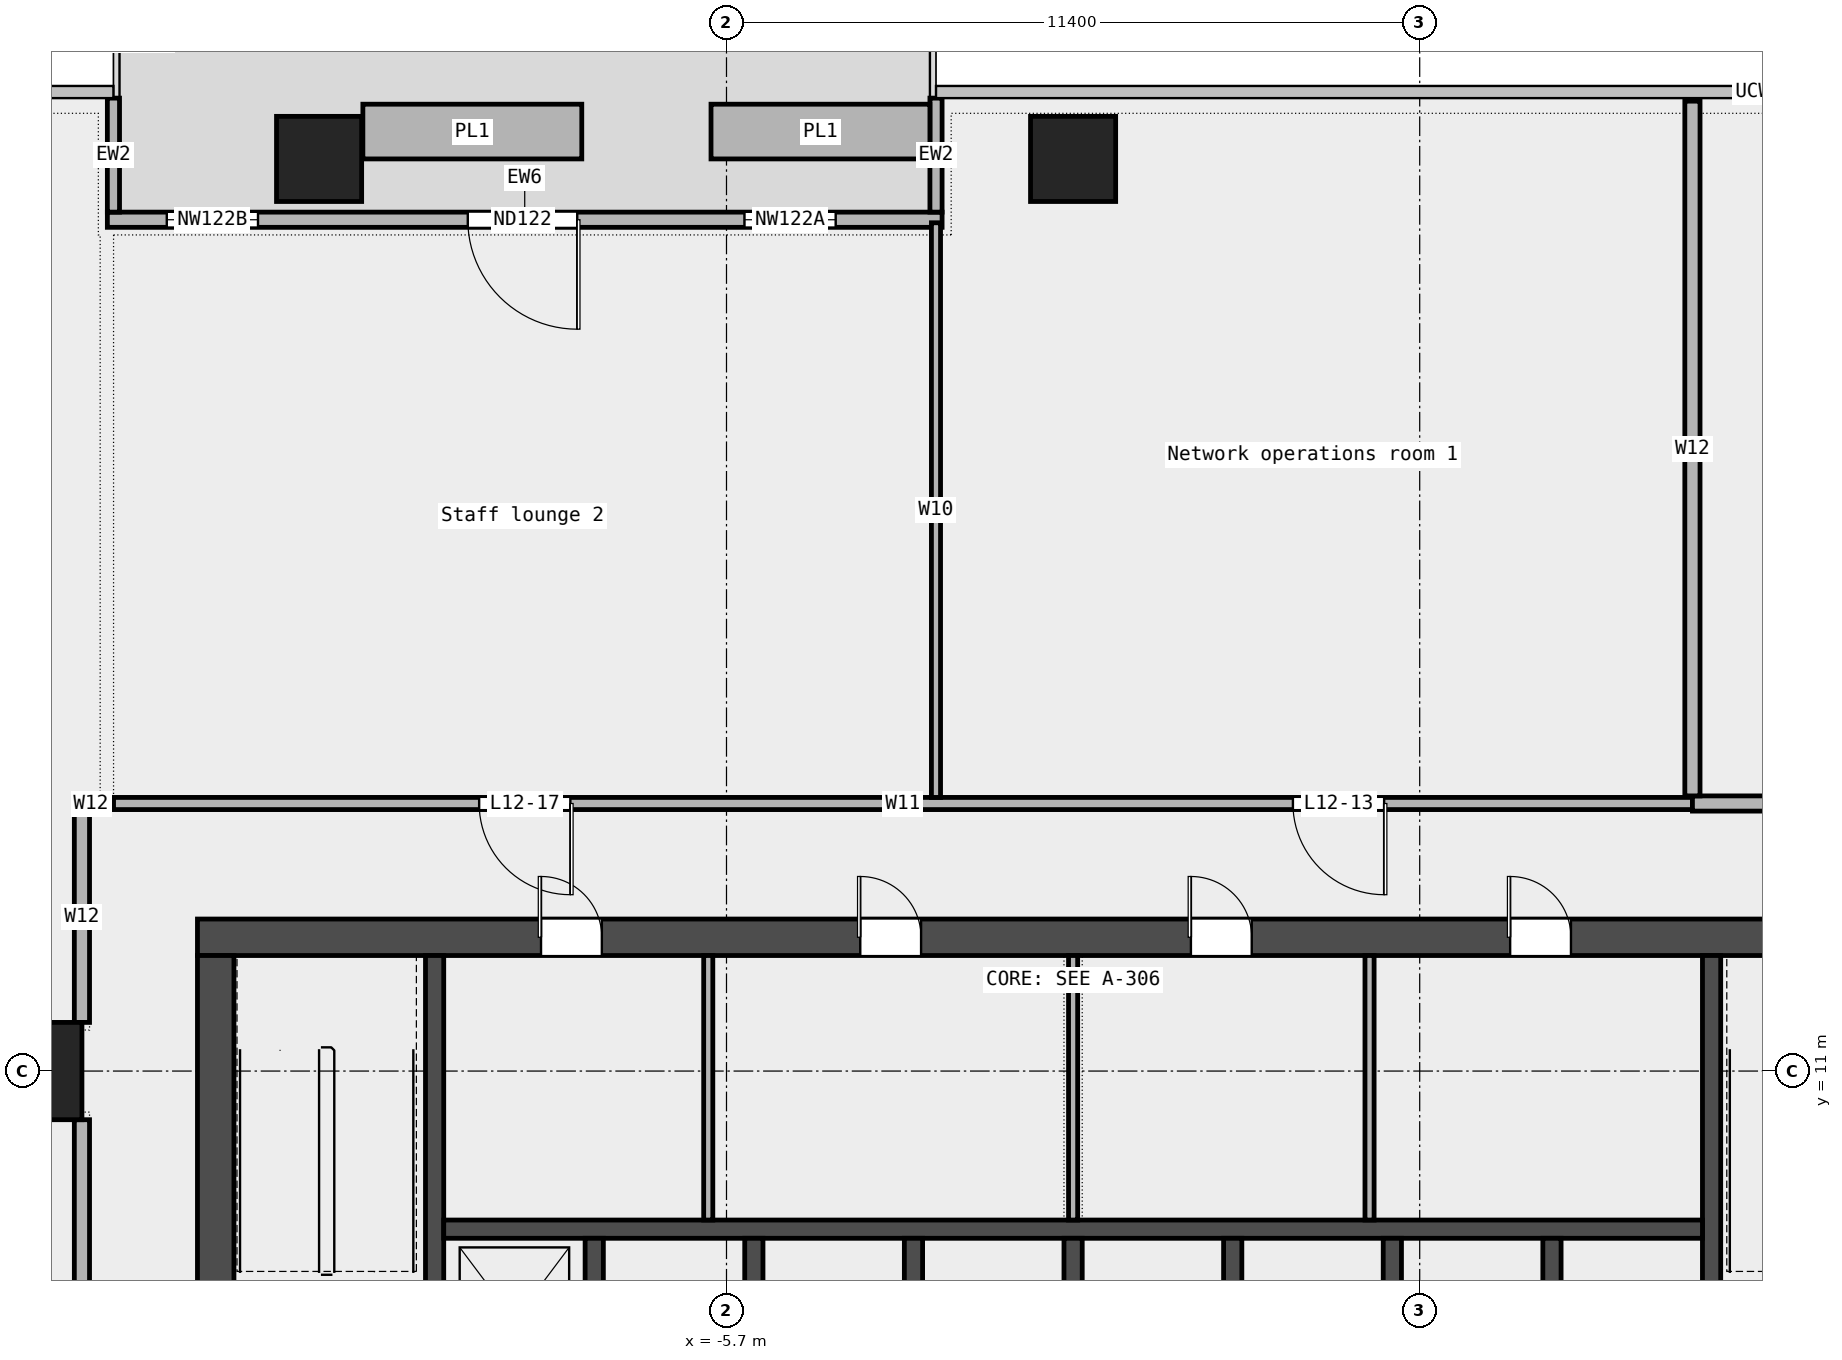
"""IFC4 building model, lengths in metres.
Left out: names, types, materials, properties, quantities, classifications, styles, units other than length and angle.
Written with IfcOpenShell. Run it as: python <this file> out.ifc"""

import sys

from ifc_helpers import new_model, si_unit, direction, frame, frame_2d, origin, origin_2d, place, context, subcontext, project, spatial, rectangle, extrude, element, fill, save


model = new_model("IFC4")
c1 = context("Model", 3, precision=1e-05, world=origin(), true_north=direction((0.0, 1.0)))
c2 = subcontext(c1, "Body", "Model", "MODEL_VIEW")
j1 = project(units=[si_unit("LENGTHUNIT", "METRE"), si_unit("PLANEANGLEUNIT", "RADIAN")], contexts=[c1])
p1 = place(None, origin())
s1 = spatial("IfcSite", under=j1, at=p1, CompositionType="ELEMENT")
p2 = place(p1, origin())
s2 = spatial("IfcBuilding", under=s1, at=p2, CompositionType="ELEMENT")
p3 = place(p2, frame((0.0, 0.0, 64.6)))
s3 = spatial("IfcBuildingStorey", under=s2, at=p3, CompositionType="ELEMENT", Elevation=64.6)
for number, where, z_axis, x_axis in (
    (1, (0.0, 26.0, 0.0), (0.0, 0.0, 1.0), (1.0, 0.0, 0.0)),
    (2, (-12.4, 26.0, 0.0), (0.0, 0.0, 1.0), (1.0, 0.0, 0.0)),
):
    element("IfcColumn", number, at=place(p3, frame(where, z_axis=z_axis, x_axis=x_axis)), inside=s3, PredefinedType="COLUMN", context=c2, shape_type="SweptSolid", body=[
        extrude(rectangle(XDim=1.4, YDim=1.4, at=origin_2d()), origin(), (0.0, 0.0, 1.0), 4.35),
    ])
p4 = place(p3, frame((-17.1, 11.0, 0.0), z_axis=(0.0, 0.0, 1.0), x_axis=(1.0, 0.0, 0.0)))
e3 = element("IfcColumn", 3, at=p4, inside=s3, PredefinedType="COLUMN", context=c2, shape_type="SweptSolid", body=[
    extrude(rectangle(XDim=1.6, YDim=1.6, at=origin_2d()), origin(), (0.0, 0.0, 1.0), 4.35),
])
p5 = place(p3, frame((-2.155, 25.0, 0.0), z_axis=(0.0, 0.0, 1.0), x_axis=(-1.0, 0.0, 0.0)))
e4 = element("IfcWall", 4, at=p5, inside=s3, PredefinedType="STANDARD", context=c2, shape_type="SweptSolid", body=[
    extrude(rectangle(XDim=13.727, YDim=0.25, at=frame_2d((6.864, 0.0))), origin(), (0.0, 0.0, 1.0), 4.35),
])
p6 = place(p5, frame((1.75, 0.0, 0.45)))
e5 = element("IfcOpeningElement", 5, at=p6, cuts=e4, PredefinedType="OPENING", context=c2, shape_type="SweptSolid", body=[
    extrude(rectangle(XDim=1.5, YDim=3.0, at=frame_2d((0.75, 1.5))), frame((0.0, 0.137, 0.0), z_axis=(0.0, -1.0, 0.0), x_axis=(1.0, 0.0, 0.0)), (0.0, 0.0, 1.0), 0.274),
])
p7 = place(p5, frame((6.0, 0.0, 0.0)))
e6 = element("IfcOpeningElement", 6, at=p7, cuts=e4, PredefinedType="OPENING", context=c2, shape_type="SweptSolid", body=[
    extrude(rectangle(XDim=1.8, YDim=2.4, at=frame_2d((0.9, 1.2))), frame((0.0, 0.137, 0.0), z_axis=(0.0, -1.0, 0.0), x_axis=(1.0, 0.0, 0.0)), (0.0, 0.0, 1.0), 0.274),
])
p8 = place(p5, frame((11.25, 0.0, 0.45)))
e7 = element("IfcOpeningElement", 7, at=p8, cuts=e4, PredefinedType="OPENING", context=c2, shape_type="SweptSolid", body=[
    extrude(rectangle(XDim=1.5, YDim=3.0, at=frame_2d((0.75, 1.5))), frame((0.0, 0.137, 0.0), z_axis=(0.0, -1.0, 0.0), x_axis=(1.0, 0.0, 0.0)), (0.0, 0.0, 1.0), 0.274),
])
for number, where, z_axis, x_axis in (
    (8, (-2.255, 27.0, 0.0), (0.0, 0.0, 1.0), (0.0, -1.0, 0.0)),
    (9, (-15.782, 27.0, 0.0), (0.0, 0.0, 1.0), (0.0, -1.0, 0.0)),
):
    element("IfcWall", number, at=place(p3, frame(where, z_axis=z_axis, x_axis=x_axis)), inside=s3, PredefinedType="STANDARD", context=c2, shape_type="SweptSolid", body=[
        extrude(rectangle(XDim=1.875, YDim=0.2, at=frame_2d((0.938, 0.0))), origin(), (0.0, 0.0, 1.0), 4.35),
    ])
for number, where, z_axis, x_axis in (
    (10, (-2.354, 26.45, 0.0), (0.0, 0.0, 1.0), (-1.0, 0.0, 0.0)),
    (11, (-8.08, 26.45, 0.0), (0.0, 0.0, 1.0), (-1.0, 0.0, 0.0)),
):
    element("IfcWall", number, at=place(p3, frame(where, z_axis=z_axis, x_axis=x_axis)), inside=s3, PredefinedType="STANDARD", context=c2, shape_type="SweptSolid", body=[
        extrude(rectangle(XDim=3.6, YDim=0.9, at=frame_2d((1.8, 0.0))), origin(), (0.0, 0.0, 1.0), 0.7),
    ])
p9 = place(p3, frame((-15.78, 15.4, 0.0), z_axis=(0.0, 0.0, 1.0), x_axis=(1.0, 0.0, 0.0)))
e12 = element("IfcWall", 12, at=p9, inside=s3, PredefinedType="PARTITIONING", context=c2, shape_type="SweptSolid", body=[
    extrude(rectangle(XDim=25.965, YDim=0.2, at=frame_2d((12.982, 0.0))), origin(), (0.0, 0.0, 1.0), 4.35),
])
p10 = place(p9, frame((19.395, 0.0, 0.0)))
e13 = element("IfcOpeningElement", 13, at=p10, cuts=e12, PredefinedType="OPENING", context=c2, shape_type="SweptSolid", body=[
    extrude(rectangle(XDim=1.5, YDim=2.1, at=frame_2d((0.75, 1.05))), frame((0.0, 0.112, 0.0), z_axis=(0.0, -1.0, 0.0), x_axis=(1.0, 0.0, 0.0)), (0.0, 0.0, 1.0), 0.224),
])
p11 = place(p9, frame((6.012, 0.0, 0.0)))
e14 = element("IfcOpeningElement", 14, at=p11, cuts=e12, PredefinedType="OPENING", context=c2, shape_type="SweptSolid", body=[
    extrude(rectangle(XDim=1.5, YDim=2.1, at=frame_2d((0.75, 1.05))), frame((0.0, 0.112, 0.0), z_axis=(0.0, -1.0, 0.0), x_axis=(1.0, 0.0, 0.0)), (0.0, 0.0, 1.0), 0.224),
])
p12 = place(p3, frame((-16.3, 15.4, 0.0), z_axis=(0.0, 0.0, 1.0), x_axis=(1.0, 0.0, 0.0)))
e15 = element("IfcWall", 15, at=p12, inside=s3, PredefinedType="PARTITIONING", context=c2, shape_type="SweptSolid", body=[
    extrude(rectangle(XDim=0.3, YDim=0.25, at=frame_2d((0.15, 0.0))), origin(), (0.0, 0.0, 1.0), 4.35),
])
p13 = place(p3, frame((10.185, 15.4, 0.0), z_axis=(0.0, 0.0, 1.0), x_axis=(1.0, 0.0, 0.0)))
e16 = element("IfcWall", 16, at=p13, inside=s3, PredefinedType="PARTITIONING", context=c2, shape_type="SweptSolid", body=[
    extrude(rectangle(XDim=11.515, YDim=0.25, at=frame_2d((5.757, 0.0))), origin(), (0.0, 0.0, 1.0), 4.35),
])
p14 = place(p13, frame((2.157, 0.0, 0.0)))
e17 = element("IfcOpeningElement", 17, at=p14, cuts=e16, PredefinedType="OPENING", context=c2, shape_type="SweptSolid", body=[
    extrude(rectangle(XDim=1.8, YDim=2.1, at=frame_2d((0.9, 1.05))), frame((0.0, 0.137, 0.0), z_axis=(0.0, -1.0, 0.0), x_axis=(1.0, 0.0, 0.0)), (0.0, 0.0, 1.0), 0.274),
])
p15 = place(p3, frame((-16.3, 0.8, 0.0), z_axis=(0.0, 0.0, 1.0), x_axis=(0.0, 1.0, 0.0)))
e18 = element("IfcWall", 18, at=p15, inside=s3, PredefinedType="PARTITIONING", context=c2, shape_type="SweptSolid", body=[
    extrude(rectangle(XDim=9.4, YDim=0.25, at=frame_2d((4.7, 0.0))), origin(), (0.0, 0.0, 1.0), 4.35),
])
p16 = place(p15, frame((3.8, 0.0, 0.0)))
e19 = element("IfcOpeningElement", 19, at=p16, cuts=e18, PredefinedType="OPENING", context=c2, shape_type="SweptSolid", body=[
    extrude(rectangle(XDim=1.8, YDim=2.1, at=frame_2d((0.9, 1.05))), frame((0.0, 0.137, 0.0), z_axis=(0.0, -1.0, 0.0), x_axis=(1.0, 0.0, 0.0)), (0.0, 0.0, 1.0), 0.274),
])
p17 = place(p3, frame((-16.3, 11.8, 0.0), z_axis=(0.0, 0.0, 1.0), x_axis=(0.0, 1.0, 0.0)))
e20 = element("IfcWall", 20, at=p17, inside=s3, PredefinedType="PARTITIONING", context=c2, shape_type="SweptSolid", body=[
    extrude(rectangle(XDim=3.475, YDim=0.25, at=frame_2d((1.737, 0.0))), origin(), (0.0, 0.0, 1.0), 4.35),
])
p18 = place(p3, frame((-2.255, 15.5, 0.0), z_axis=(0.0, 0.0, 1.0), x_axis=(0.0, 1.0, 0.0)))
e21 = element("IfcWall", 21, at=p18, inside=s3, PredefinedType="PARTITIONING", context=c2, shape_type="SweptSolid", body=[
    extrude(rectangle(XDim=9.45, YDim=0.15, at=frame_2d((4.725, 0.0))), origin(), (0.0, 0.0, 1.0), 4.35),
])
p19 = place(p3, frame((10.185, 15.525, 0.0), z_axis=(0.0, 0.0, 1.0), x_axis=(0.0, 1.0, 0.0)))
e22 = element("IfcWall", 22, at=p19, inside=s3, PredefinedType="PARTITIONING", context=c2, shape_type="SweptSolid", body=[
    extrude(rectangle(XDim=11.425, YDim=0.25, at=frame_2d((5.712, 0.0))), origin(), (0.0, 0.0, 1.0), 4.35),
])
p20 = place(p3, frame((-14.4, 13.2, 0.0), z_axis=(0.0, 0.0, 1.0), x_axis=(1.0, 0.0, 0.0)))
e23 = element("IfcWall", 23, at=p20, inside=s3, PredefinedType="SHEAR", context=c2, shape_type="SweptSolid", body=[
    extrude(rectangle(XDim=28.8, YDim=0.6, at=frame_2d((14.4, 0.0))), origin(), (0.0, 0.0, 1.0), 4.5),
])
p21 = place(p20, frame((5.65, 0.0, 0.0)))
e24 = element("IfcOpeningElement", 24, at=p21, cuts=e23, PredefinedType="OPENING", context=c2, shape_type="SweptSolid", body=[
    extrude(rectangle(XDim=1.0, YDim=2.1, at=frame_2d((0.5, 1.05))), frame((0.0, 0.312, 0.0), z_axis=(0.0, -1.0, 0.0), x_axis=(1.0, 0.0, 0.0)), (0.0, 0.0, 1.0), 0.624),
])
p22 = place(p20, frame((10.9, 0.0, 0.0)))
e25 = element("IfcOpeningElement", 25, at=p22, cuts=e23, PredefinedType="OPENING", context=c2, shape_type="SweptSolid", body=[
    extrude(rectangle(XDim=1.0, YDim=2.1, at=frame_2d((0.5, 1.05))), frame((0.0, 0.312, 0.0), z_axis=(0.0, -1.0, 0.0), x_axis=(1.0, 0.0, 0.0)), (0.0, 0.0, 1.0), 0.624),
])
p23 = place(p20, frame((16.337, 0.0, 0.0)))
e26 = element("IfcOpeningElement", 26, at=p23, cuts=e23, PredefinedType="OPENING", context=c2, shape_type="SweptSolid", body=[
    extrude(rectangle(XDim=1.0, YDim=2.1, at=frame_2d((0.5, 1.05))), frame((0.0, 0.312, 0.0), z_axis=(0.0, -1.0, 0.0), x_axis=(1.0, 0.0, 0.0)), (0.0, 0.0, 1.0), 0.624),
])
p24 = place(p20, frame((21.587, 0.0, 0.0)))
e27 = element("IfcOpeningElement", 27, at=p24, cuts=e23, PredefinedType="OPENING", context=c2, shape_type="SweptSolid", body=[
    extrude(rectangle(XDim=1.0, YDim=2.1, at=frame_2d((0.5, 1.05))), frame((0.0, 0.312, 0.0), z_axis=(0.0, -1.0, 0.0), x_axis=(1.0, 0.0, 0.0)), (0.0, 0.0, 1.0), 0.624),
])
p25 = place(p3, frame((-14.1, -6.6, 0.0), z_axis=(0.0, 0.0, 1.0), x_axis=(0.0, 1.0, 0.0)))
e28 = element("IfcWall", 28, at=p25, inside=s3, PredefinedType="SHEAR", context=c2, shape_type="SweptSolid", body=[
    extrude(rectangle(XDim=19.5, YDim=0.6, at=frame_2d((9.75, 0.0))), origin(), (0.0, 0.0, 1.0), 4.5),
])
p26 = place(p25, frame((9.3, 0.0, 0.0)))
e29 = element("IfcOpeningElement", 29, at=p26, cuts=e28, PredefinedType="OPENING", context=c2, shape_type="SweptSolid", body=[
    extrude(rectangle(XDim=1.8, YDim=2.1, at=frame_2d((0.9, 1.05))), frame((0.0, 0.312, 0.0), z_axis=(0.0, -1.0, 0.0), x_axis=(1.0, 0.0, 0.0)), (0.0, 0.0, 1.0), 0.624),
])
for number, where, z_axis, x_axis in (
    (30, (-10.5, 5.25, 0.0), (0.0, 0.0, 1.0), (0.0, 1.0, 0.0)),
    (31, (10.5, 5.25, 0.0), (0.0, 0.0, 1.0), (0.0, 1.0, 0.0)),
):
    element("IfcWall", number, at=place(p3, frame(where, z_axis=z_axis, x_axis=x_axis)), inside=s3, PredefinedType="SHEAR", context=c2, shape_type="SweptSolid", body=[
        extrude(rectangle(XDim=7.65, YDim=0.3, at=frame_2d((3.825, 0.0))), origin(), (0.0, 0.0, 1.0), 4.5),
    ])
p27 = place(p3, frame((-10.35, 8.4, 0.0), z_axis=(0.0, 0.0, 1.0), x_axis=(1.0, 0.0, 0.0)))
e32 = element("IfcWall", 32, at=p27, inside=s3, PredefinedType="SOLIDWALL", context=c2, shape_type="SweptSolid", body=[
    extrude(rectangle(XDim=20.7, YDim=0.3, at=frame_2d((10.35, 0.0))), origin(), (0.0, 0.0, 1.0), 4.5),
])
for number, where, z_axis, x_axis in (
    (33, (-7.875, 5.55, 0.0), (0.0, 0.0, 1.0), (0.0, 1.0, 0.0)),
    (34, (-5.25, 5.55, 0.0), (0.0, 0.0, 1.0), (0.0, 1.0, 0.0)),
    (35, (-2.625, 5.55, 0.0), (0.0, 0.0, 1.0), (0.0, 1.0, 0.0)),
    (36, (0.0, 5.55, 0.0), (0.0, 0.0, 1.0), (0.0, 1.0, 0.0)),
    (37, (2.625, 5.55, 0.0), (0.0, 0.0, 1.0), (0.0, 1.0, 0.0)),
    (38, (5.25, 5.55, 0.0), (0.0, 0.0, 1.0), (0.0, 1.0, 0.0)),
    (39, (7.875, 5.55, 0.0), (0.0, 0.0, 1.0), (0.0, 1.0, 0.0)),
):
    element("IfcWall", number, at=place(p3, frame(where, z_axis=z_axis, x_axis=x_axis)), inside=s3, PredefinedType="SOLIDWALL", context=c2, shape_type="SweptSolid", body=[
        extrude(rectangle(XDim=2.7, YDim=0.3, at=frame_2d((1.35, 0.0))), origin(), (0.0, 0.0, 1.0), 4.5),
    ])
for number, where, z_axis, x_axis in (
    (40, (-6.0, 8.55, 0.0), (0.0, 0.0, 1.0), (0.0, 1.0, 0.0)),
    (41, (0.0, 8.55, 0.0), (0.0, 0.0, 1.0), (0.0, 1.0, 0.0)),
    (42, (4.875, 8.55, 0.0), (0.0, 0.0, 1.0), (0.0, 1.0, 0.0)),
):
    element("IfcWall", number, at=place(p3, frame(where, z_axis=z_axis, x_axis=x_axis)), inside=s3, PredefinedType="PARTITIONING", context=c2, shape_type="SweptSolid", body=[
        extrude(rectangle(XDim=4.35, YDim=0.15, at=frame_2d((2.175, 0.0))), origin(), (0.0, 0.0, 1.0), 4.5),
    ])
p28 = place(p6, origin())
e43 = element("IfcWindow", 43, at=p28, inside=s3, PartitioningType="SINGLE_PANEL", PredefinedType="WINDOW", context=c2, shape_type="SweptSolid", body=[
    extrude(rectangle(XDim=1.5, YDim=3.0, at=frame_2d((0.75, 1.5))), frame((0.0, 0.03, 0.0), z_axis=(0.0, -1.0, 0.0), x_axis=(1.0, 0.0, 0.0)), (0.0, 0.0, 1.0), 0.06),
])
fill(e5, e43)
p29 = place(p7, origin())
e44 = element("IfcDoor", 44, at=p29, inside=s3, OperationType="DOUBLE_DOOR_SINGLE_SWING", PredefinedType="DOOR", context=c2, shape_type="SweptSolid", body=[
    extrude(rectangle(XDim=1.8, YDim=2.4, at=frame_2d((0.9, 1.2))), frame((0.0, 0.025, 0.0), z_axis=(0.0, -1.0, 0.0), x_axis=(1.0, 0.0, 0.0)), (0.0, 0.0, 1.0), 0.05),
])
fill(e6, e44)
p30 = place(p8, origin())
e45 = element("IfcWindow", 45, at=p30, inside=s3, PartitioningType="SINGLE_PANEL", PredefinedType="WINDOW", context=c2, shape_type="SweptSolid", body=[
    extrude(rectangle(XDim=1.5, YDim=3.0, at=frame_2d((0.75, 1.5))), frame((0.0, 0.03, 0.0), z_axis=(0.0, -1.0, 0.0), x_axis=(1.0, 0.0, 0.0)), (0.0, 0.0, 1.0), 0.06),
])
fill(e7, e45)
p31 = place(p10, origin())
e46 = element("IfcDoor", 46, at=p31, inside=s3, OperationType="DOUBLE_DOOR_SINGLE_SWING", PredefinedType="DOOR", context=c2, shape_type="SweptSolid", body=[
    extrude(rectangle(XDim=1.5, YDim=2.1, at=frame_2d((0.75, 1.05))), frame((0.0, 0.025, 0.0), z_axis=(0.0, -1.0, 0.0), x_axis=(1.0, 0.0, 0.0)), (0.0, 0.0, 1.0), 0.05),
])
fill(e13, e46)
p32 = place(p11, origin())
e47 = element("IfcDoor", 47, at=p32, inside=s3, OperationType="DOUBLE_DOOR_SINGLE_SWING", PredefinedType="DOOR", context=c2, shape_type="SweptSolid", body=[
    extrude(rectangle(XDim=1.5, YDim=2.1, at=frame_2d((0.75, 1.05))), frame((0.0, 0.025, 0.0), z_axis=(0.0, -1.0, 0.0), x_axis=(1.0, 0.0, 0.0)), (0.0, 0.0, 1.0), 0.05),
])
fill(e14, e47)
p33 = place(p21, origin())
e48 = element("IfcDoor", 48, at=p33, inside=s3, OperationType="SINGLE_SWING_LEFT", PredefinedType="DOOR", context=c2, shape_type="SweptSolid", body=[
    extrude(rectangle(XDim=1.0, YDim=2.1, at=frame_2d((0.5, 1.05))), frame((0.0, 0.025, 0.0), z_axis=(0.0, -1.0, 0.0), x_axis=(1.0, 0.0, 0.0)), (0.0, 0.0, 1.0), 0.05),
])
fill(e24, e48)
p34 = place(p22, origin())
e49 = element("IfcDoor", 49, at=p34, inside=s3, OperationType="SINGLE_SWING_LEFT", PredefinedType="DOOR", context=c2, shape_type="SweptSolid", body=[
    extrude(rectangle(XDim=1.0, YDim=2.1, at=frame_2d((0.5, 1.05))), frame((0.0, 0.025, 0.0), z_axis=(0.0, -1.0, 0.0), x_axis=(1.0, 0.0, 0.0)), (0.0, 0.0, 1.0), 0.05),
])
fill(e25, e49)
p35 = place(p23, origin())
e50 = element("IfcDoor", 50, at=p35, inside=s3, OperationType="SINGLE_SWING_LEFT", PredefinedType="DOOR", context=c2, shape_type="SweptSolid", body=[
    extrude(rectangle(XDim=1.0, YDim=2.1, at=frame_2d((0.5, 1.05))), frame((0.0, 0.025, 0.0), z_axis=(0.0, -1.0, 0.0), x_axis=(1.0, 0.0, 0.0)), (0.0, 0.0, 1.0), 0.05),
])
fill(e26, e50)
p36 = place(p24, origin())
e51 = element("IfcDoor", 51, at=p36, inside=s3, OperationType="SINGLE_SWING_LEFT", PredefinedType="DOOR", context=c2, shape_type="SweptSolid", body=[
    extrude(rectangle(XDim=1.0, YDim=2.1, at=frame_2d((0.5, 1.05))), frame((0.0, 0.025, 0.0), z_axis=(0.0, -1.0, 0.0), x_axis=(1.0, 0.0, 0.0)), (0.0, 0.0, 1.0), 0.05),
])
fill(e27, e51)
save(model, sys.argv[1])
